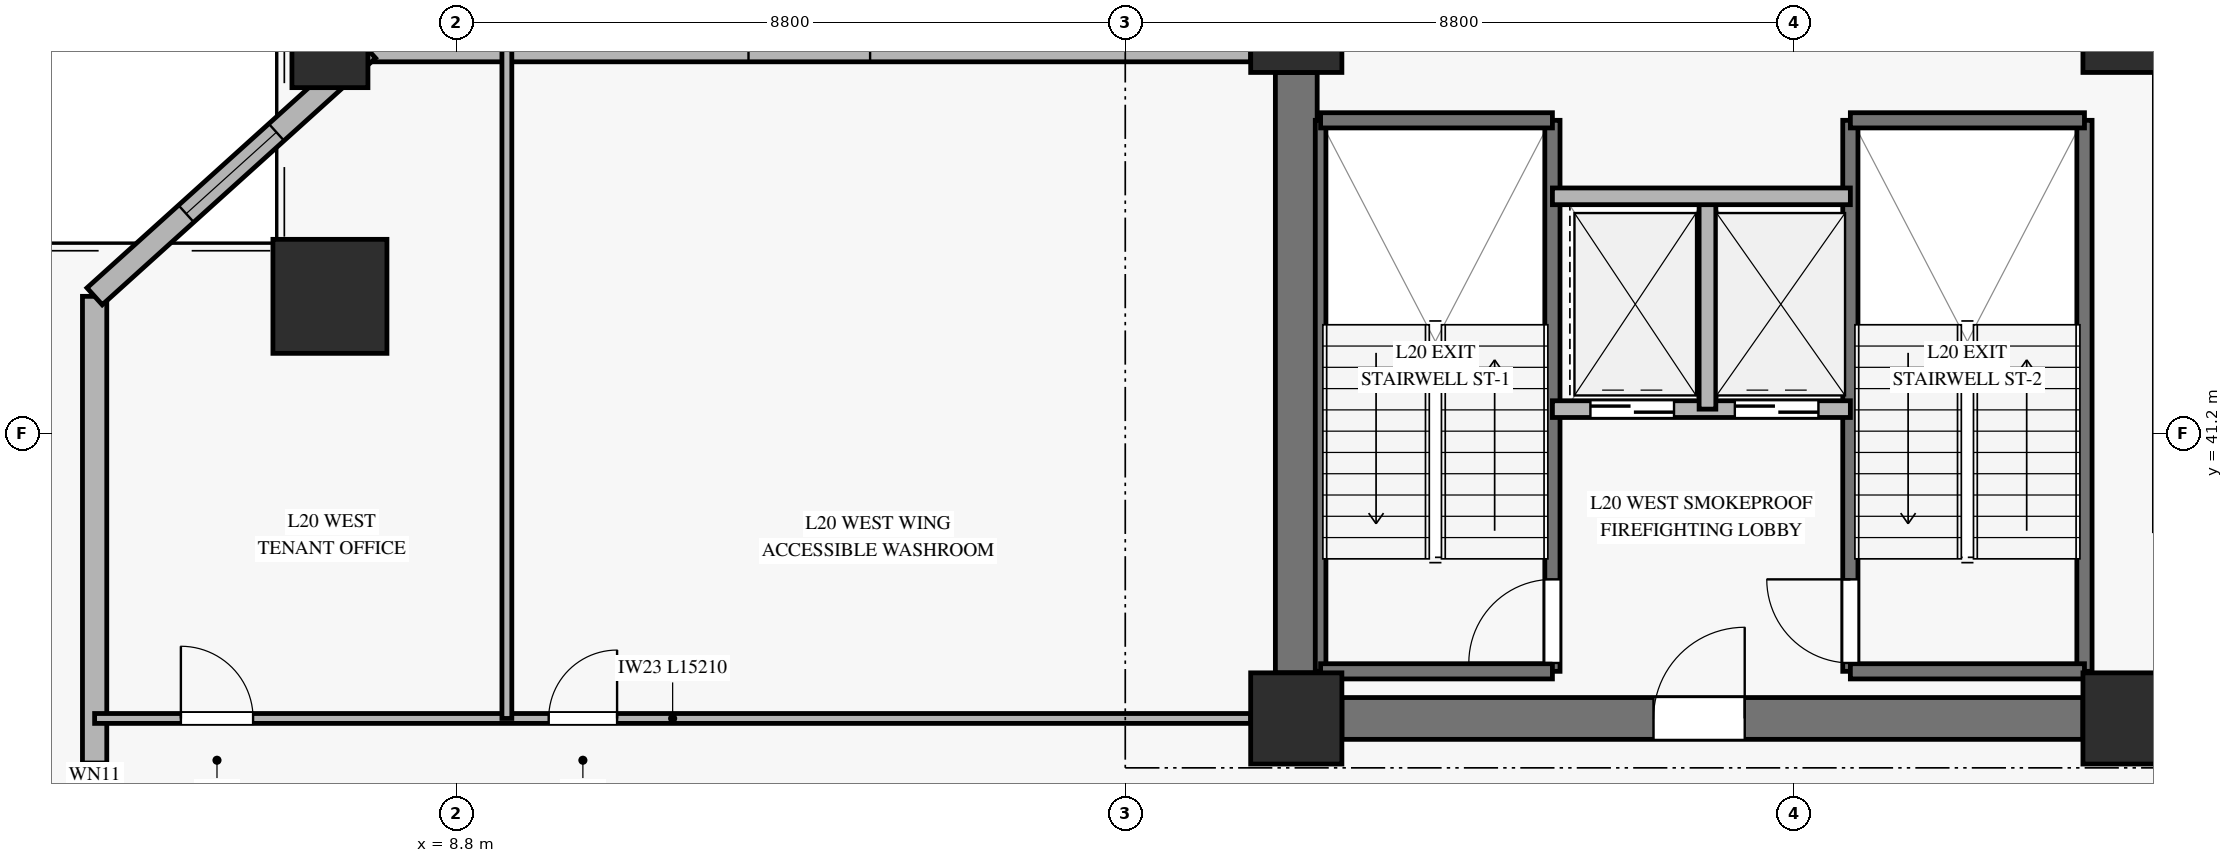
"""IFC4 building model, lengths in metres.
Left out: names, types, materials, properties, quantities, classifications, styles, units other than length and angle.
Written with IfcOpenShell. Run it as: python <this file> out.ifc"""

import sys

from ifc_helpers import new_model, si_unit, direction, frame, frame_2d, origin, origin_2d, place, context, subcontext, project, spatial, rectangle, hollow_rectangle, extrude, source, transform, mapped, element, fill, save


model = new_model("IFC4")
c1 = context("Model", 3, precision=1e-05, world=origin(), true_north=direction((0.0, 1.0)))
c2 = subcontext(c1, "Body", "Model", "MODEL_VIEW")
j1 = project(units=[si_unit("LENGTHUNIT", "METRE"), si_unit("PLANEANGLEUNIT", "RADIAN")], contexts=[c1])
p1 = place(None, origin())
s1 = spatial("IfcSite", under=j1, at=p1, CompositionType="ELEMENT")
p2 = place(p1, origin())
s2 = spatial("IfcBuilding", under=s1, at=p2, CompositionType="ELEMENT")
p3 = place(p2, frame((0.0, 0.0, 83.5)))
s3 = spatial("IfcBuildingStorey", under=s2, at=p3, CompositionType="ELEMENT", Elevation=83.5)
m1 = source(origin(), c2, "Body", "SweptSolid", [
    extrude(rectangle(XDim=1.2, YDim=1.2, at=origin_2d()), origin(), (0.0, 0.0, 1.0), 3.68),
])
for number, where, z_axis, x_axis in (
    (1, (19.85, 37.45, 0.0), (0.0, 0.0, 1.0), (1.0, 0.0, 0.0)),
    (2, (19.85, 46.55, 0.0), (0.0, 0.0, 1.0), (1.0, 0.0, 0.0)),
    (3, (30.8, 37.45, 0.0), (0.0, 0.0, 1.0), (1.0, 0.0, 0.0)),
    (4, (30.8, 46.55, 0.0), (0.0, 0.0, 1.0), (1.0, 0.0, 0.0)),
):
    element("IfcColumn", number, at=place(p3, frame(where, z_axis=z_axis, x_axis=x_axis)), inside=s3, PredefinedType="PILASTER", context=c2, shape_type="MappedRepresentation", body=[
        mapped(m1, transform((0.0, 0.0, 0.0), x_axis=(1.0, 0.0, 0.0), y_axis=(0.0, 1.0, 0.0), z_axis=(0.0, 0.0, 1.0), scale=1.0)),
    ])
p4 = place(p3, frame((20.45, 37.45, 0.0), z_axis=(0.0, 0.0, 1.0), x_axis=(1.0, 0.0, 0.0)))
e5 = element("IfcWall", 5, at=p4, inside=s3, PredefinedType="SHEAR", context=c2, shape_type="SweptSolid", body=[
    extrude(rectangle(XDim=9.75, YDim=0.55, at=frame_2d((4.875, 0.0))), origin(), (0.0, 0.0, 1.0), 3.68),
])
p5 = place(p4, frame((4.1, 0.0, 0.0)))
e6 = element("IfcOpeningElement", 6, at=p5, cuts=e5, PredefinedType="OPENING", context=c2, shape_type="SweptSolid", body=[
    extrude(rectangle(XDim=1.2, YDim=2.15, at=frame_2d((0.6, 1.075))), frame((0.0, 0.285, 0.0), z_axis=(0.0, -1.0, 0.0), x_axis=(1.0, 0.0, 0.0)), (0.0, 0.0, 1.0), 0.57),
])
p6 = place(p3, frame((19.85, 38.05, 0.0), z_axis=(0.0, 0.0, 1.0), x_axis=(0.0, 1.0, 0.0)))
e7 = element("IfcWall", 7, at=p6, inside=s3, PredefinedType="SHEAR", context=c2, shape_type="SweptSolid", body=[
    extrude(rectangle(XDim=7.9, YDim=0.55, at=frame_2d((3.95, 0.0))), origin(), (0.0, 0.0, 1.0), 3.68),
])
m2 = source(origin(), c2, "Body", "SweptSolid", [
    extrude(hollow_rectangle(XDim=1.5, YDim=1.5, WallThickness=0.07, at=origin_2d()), origin(), (0.0, 0.0, 1.0), 3.686),
])
p7 = place(p3, frame((7.136, 43.004, 0.0), z_axis=(0.056697506007, 0.007087188251, 0.998366247714), x_axis=(-0.124034734589, 0.992277876714, 0.0)))
e8 = element("IfcColumn", 8, at=p7, inside=s3, PredefinedType="COLUMN", context=c2, shape_type="MappedRepresentation", body=[
    mapped(m2, transform((0.0, 0.0, 0.0), x_axis=(1.0, 0.0, 0.0), y_axis=(0.0, 1.0, 0.0), z_axis=(0.0, 0.0, 1.0), scale=1.0)),
])
m3 = source(origin(), c2, "Body", "SweptSolid", [
    extrude(hollow_rectangle(XDim=1.0, YDim=1.0, WallThickness=0.045, at=origin_2d()), origin(), (0.0, 0.0, 1.0), 3.686),
])
p8 = place(p3, frame((7.136, 46.25, 0.0), z_axis=(0.056698929969, 0.0, 0.998391321747), x_axis=(0.0, 1.0, 0.0)))
e9 = element("IfcColumn", 9, at=p8, inside=s3, PredefinedType="COLUMN", context=c2, shape_type="MappedRepresentation", body=[
    mapped(m3, transform((0.0, 0.0, 0.0), x_axis=(1.0, 0.0, 0.0), y_axis=(0.0, 1.0, 0.0), z_axis=(0.0, 0.0, 1.0), scale=1.0)),
])
p9 = place(p3, frame((4.04, 26.255, 0.0), z_axis=(0.0, 0.0, 1.0), x_axis=(0.0, 1.0, 0.0)))
e10 = element("IfcWall", 10, at=p9, inside=s3, PredefinedType="SOLIDWALL", context=c2, shape_type="SweptSolid", body=[
    extrude(rectangle(XDim=16.749, YDim=0.32, at=frame_2d((8.375, 0.0))), origin(), (0.0, 0.0, 1.0), 3.16),
])
p10 = place(p9, frame((9.425, 0.0, 0.45)))
e11 = element("IfcOpeningElement", 11, at=p10, cuts=e10, PredefinedType="OPENING", context=c2, shape_type="SweptSolid", body=[
    extrude(rectangle(XDim=1.2, YDim=2.0, at=frame_2d((0.6, 1.0))), frame((0.0, 0.17, 0.0), z_axis=(0.0, -1.0, 0.0), x_axis=(1.0, 0.0, 0.0)), (0.0, 0.0, 1.0), 0.34),
])
p11 = place(p3, frame((7.636, 46.25, 0.0), z_axis=(0.0, 0.0, 1.0), x_axis=(1.0, 0.0, 0.0)))
e12 = element("IfcWall", 12, at=p11, inside=s3, PredefinedType="SOLIDWALL", context=c2, shape_type="SweptSolid", body=[
    extrude(rectangle(XDim=11.614, YDim=0.32, at=frame_2d((5.807, 0.0))), origin(), (0.0, 0.0, 1.0), 3.16),
])
p12 = place(p11, frame((5.007, 0.0, 0.45)))
e13 = element("IfcOpeningElement", 13, at=p12, cuts=e12, PredefinedType="OPENING", context=c2, shape_type="SweptSolid", body=[
    extrude(rectangle(XDim=1.6, YDim=2.0, at=frame_2d((0.8, 1.0))), frame((0.0, 0.17, 0.0), z_axis=(0.0, -1.0, 0.0), x_axis=(1.0, 0.0, 0.0)), (0.0, 0.0, 1.0), 0.34),
])
p13 = place(p3, frame((7.636, 46.25, 0.0), z_axis=(0.0, 0.0, 1.0), x_axis=(-0.742293455996, -0.670074939977, 0.0)))
e14 = element("IfcWall", 14, at=p13, inside=s3, PredefinedType="SOLIDWALL", context=c2, shape_type="SweptSolid", body=[
    extrude(rectangle(XDim=4.844, YDim=0.3, at=frame_2d((2.422, 0.0))), origin(), (0.0, 0.0, 1.0), 3.16),
])
p14 = place(p13, frame((1.622, 0.0, 0.45)))
e15 = element("IfcOpeningElement", 15, at=p14, cuts=e14, PredefinedType="OPENING", context=c2, shape_type="SweptSolid", body=[
    extrude(rectangle(XDim=1.6, YDim=2.0, at=frame_2d((0.8, 1.0))), frame((0.0, 0.16, 0.0), z_axis=(0.0, -1.0, 0.0), x_axis=(1.0, 0.0, 0.0)), (0.0, 0.0, 1.0), 0.32),
])
p15 = place(p3, frame((20.17, 38.07, 0.0), z_axis=(0.0, 0.0, 1.0), x_axis=(0.0, 1.0, 0.0)))
e16 = element("IfcWall", 16, at=p15, inside=s3, PredefinedType="SOLIDWALL", context=c2, shape_type="SweptSolid", body=[
    extrude(rectangle(XDim=7.25, YDim=0.14, at=frame_2d((3.625, 0.0))), origin(), (0.0, 0.0, 1.0), 3.9),
])
p16 = place(p3, frame((23.22, 38.07, 0.0), z_axis=(0.0, 0.0, 1.0), x_axis=(0.0, 1.0, 0.0)))
e17 = element("IfcWall", 17, at=p16, inside=s3, PredefinedType="SOLIDWALL", context=c2, shape_type="SweptSolid", body=[
    extrude(rectangle(XDim=7.25, YDim=0.2, at=frame_2d((3.625, 0.0))), origin(), (0.0, 0.0, 1.0), 3.9),
])
p17 = place(p16, frame((0.11, 0.0, 0.0)))
e18 = element("IfcOpeningElement", 18, at=p17, cuts=e17, PredefinedType="OPENING", context=c2, shape_type="SweptSolid", body=[
    extrude(rectangle(XDim=1.1, YDim=2.15, at=frame_2d((0.55, 1.075))), frame((0.0, 0.11, 0.0), z_axis=(0.0, -1.0, 0.0), x_axis=(1.0, 0.0, 0.0)), (0.0, 0.0, 1.0), 0.22),
])
for number, where, z_axis, x_axis in (
    (19, (20.17, 45.32, 0.0), (0.0, 0.0, 1.0), (1.0, 0.0, 0.0)),
    (20, (20.17, 38.07, 0.0), (0.0, 0.0, 1.0), (1.0, 0.0, 0.0)),
):
    element("IfcWall", number, at=place(p3, frame(where, z_axis=z_axis, x_axis=x_axis)), inside=s3, PredefinedType="SOLIDWALL", context=c2, shape_type="SweptSolid", body=[
        extrude(rectangle(XDim=3.05, YDim=0.2, at=frame_2d((1.525, 0.0))), origin(), (0.0, 0.0, 1.0), 3.9),
    ])
p18 = place(p3, frame((27.14, 38.07, 0.0), z_axis=(0.0, 0.0, 1.0), x_axis=(0.0, 1.0, 0.0)))
e21 = element("IfcWall", 21, at=p18, inside=s3, PredefinedType="SOLIDWALL", context=c2, shape_type="SweptSolid", body=[
    extrude(rectangle(XDim=7.25, YDim=0.2, at=frame_2d((3.625, 0.0))), origin(), (0.0, 0.0, 1.0), 3.9),
])
p19 = place(p18, frame((0.11, 0.0, 0.0)))
e22 = element("IfcOpeningElement", 22, at=p19, cuts=e21, PredefinedType="OPENING", context=c2, shape_type="SweptSolid", body=[
    extrude(rectangle(XDim=1.1, YDim=2.15, at=frame_2d((0.55, 1.075))), frame((0.0, 0.11, 0.0), z_axis=(0.0, -1.0, 0.0), x_axis=(1.0, 0.0, 0.0)), (0.0, 0.0, 1.0), 0.22),
])
p20 = place(p3, frame((30.22, 38.07, 0.0), z_axis=(0.0, 0.0, 1.0), x_axis=(0.0, 1.0, 0.0)))
e23 = element("IfcWall", 23, at=p20, inside=s3, PredefinedType="SOLIDWALL", context=c2, shape_type="SweptSolid", body=[
    extrude(rectangle(XDim=7.25, YDim=0.2, at=frame_2d((3.625, 0.0))), origin(), (0.0, 0.0, 1.0), 3.9),
])
for number, where, z_axis, x_axis in (
    (24, (27.14, 45.32, 0.0), (0.0, 0.0, 1.0), (1.0, 0.0, 0.0)),
    (25, (27.14, 38.07, 0.0), (0.0, 0.0, 1.0), (1.0, 0.0, 0.0)),
):
    element("IfcWall", number, at=place(p3, frame(where, z_axis=z_axis, x_axis=x_axis)), inside=s3, PredefinedType="SOLIDWALL", context=c2, shape_type="SweptSolid", body=[
        extrude(rectangle(XDim=3.08, YDim=0.2, at=frame_2d((1.54, 0.0))), origin(), (0.0, 0.0, 1.0), 3.9),
    ])
p21 = place(p3, frame((23.22, 41.52, 0.0), z_axis=(0.0, 0.0, 1.0), x_axis=(1.0, 0.0, 0.0)))
e26 = element("IfcWall", 26, at=p21, inside=s3, PredefinedType="SOLIDWALL", context=c2, shape_type="SweptSolid", body=[
    extrude(rectangle(XDim=3.92, YDim=0.22, at=frame_2d((1.96, 0.0))), origin(), (0.0, 0.0, 1.0), 3.68),
])
p22 = place(p21, frame((0.5, 0.0, 0.0)))
e27 = element("IfcOpeningElement", 27, at=p22, cuts=e26, PredefinedType="OPENING", context=c2, shape_type="SweptSolid", body=[
    extrude(rectangle(XDim=1.1, YDim=2.2, at=frame_2d((0.55, 1.1))), frame((0.0, 0.12, 0.0), z_axis=(0.0, -1.0, 0.0), x_axis=(1.0, 0.0, 0.0)), (0.0, 0.0, 1.0), 0.24),
])
p23 = place(p21, frame((2.4, 0.0, 0.0)))
e28 = element("IfcOpeningElement", 28, at=p23, cuts=e26, PredefinedType="OPENING", context=c2, shape_type="SweptSolid", body=[
    extrude(rectangle(XDim=1.1, YDim=2.2, at=frame_2d((0.55, 1.1))), frame((0.0, 0.12, 0.0), z_axis=(0.0, -1.0, 0.0), x_axis=(1.0, 0.0, 0.0)), (0.0, 0.0, 1.0), 0.24),
])
p24 = place(p3, frame((25.26, 41.52, 0.0), z_axis=(0.0, 0.0, 1.0), x_axis=(0.0, 1.0, 0.0)))
e29 = element("IfcWall", 29, at=p24, inside=s3, PredefinedType="SOLIDWALL", context=c2, shape_type="SweptSolid", body=[
    extrude(rectangle(XDim=2.8, YDim=0.22, at=frame_2d((1.4, 0.0))), origin(), (0.0, 0.0, 1.0), 3.68),
])
p25 = place(p3, frame((23.22, 44.32, 0.0), z_axis=(0.0, 0.0, 1.0), x_axis=(1.0, 0.0, 0.0)))
e30 = element("IfcWall", 30, at=p25, inside=s3, PredefinedType="SOLIDWALL", context=c2, shape_type="SweptSolid", body=[
    extrude(rectangle(XDim=3.92, YDim=0.22, at=frame_2d((1.96, 0.0))), origin(), (0.0, 0.0, 1.0), 3.68),
])
p26 = place(p3, frame((4.04, 37.45, 0.0), z_axis=(0.0, 0.0, 1.0), x_axis=(1.0, 0.0, 0.0)))
e31 = element("IfcWall", 31, at=p26, inside=s3, PredefinedType="PARTITIONING", context=c2, shape_type="SweptSolid", body=[
    extrude(rectangle(XDim=15.21, YDim=0.13, at=frame_2d((7.605, 0.0))), origin(), (0.0, 0.0, 1.0), 3.165),
])
p27 = place(p26, frame((1.135, 0.0, 0.0)))
e32 = element("IfcOpeningElement", 32, at=p27, cuts=e31, PredefinedType="OPENING", context=c2, shape_type="SweptSolid", body=[
    extrude(rectangle(XDim=0.95, YDim=2.1, at=frame_2d((0.475, 1.05))), frame((0.0, 0.075, 0.0), z_axis=(0.0, -1.0, 0.0), x_axis=(1.0, 0.0, 0.0)), (0.0, 0.0, 1.0), 0.15),
])
p28 = place(p26, frame((5.974, 0.0, 0.0)))
e33 = element("IfcOpeningElement", 33, at=p28, cuts=e31, PredefinedType="OPENING", context=c2, shape_type="SweptSolid", body=[
    extrude(rectangle(XDim=0.9, YDim=2.1, at=frame_2d((0.45, 1.05))), frame((0.0, 0.075, 0.0), z_axis=(0.0, -1.0, 0.0), x_axis=(1.0, 0.0, 0.0)), (0.0, 0.0, 1.0), 0.15),
])
p29 = place(p3, frame((9.464, 37.45, 0.0), z_axis=(0.0, 0.0, 1.0), x_axis=(0.0, 1.0, 0.0)))
e34 = element("IfcWall", 34, at=p29, inside=s3, PredefinedType="PARTITIONING", context=c2, shape_type="SweptSolid", body=[
    extrude(rectangle(XDim=8.8, YDim=0.13, at=frame_2d((4.4, 0.0))), origin(), (0.0, 0.0, 1.0), 3.68),
])
m4 = source(origin(), c2, "Body", "SweptSolid", [
    extrude(rectangle(XDim=1.2, YDim=2.0, at=frame_2d((0.6, 1.0))), frame((0.0, 0.03, 0.0), z_axis=(0.0, -1.0, 0.0), x_axis=(1.0, 0.0, 0.0)), (0.0, 0.0, 1.0), 0.06),
])
p30 = place(p10, origin())
e35 = element("IfcWindow", 35, at=p30, inside=s3, PartitioningType="SINGLE_PANEL", PredefinedType="WINDOW", context=c2, shape_type="MappedRepresentation", body=[
    mapped(m4, transform((0.0, 0.0, 0.0), x_axis=(1.0, 0.0, 0.0), y_axis=(0.0, 1.0, 0.0), z_axis=(0.0, 0.0, 1.0), scale=1.0)),
])
fill(e11, e35)
m5 = source(origin(), c2, "Body", "SweptSolid", [
    extrude(rectangle(XDim=1.6, YDim=2.0, at=frame_2d((0.8, 1.0))), frame((0.0, 0.03, 0.0), z_axis=(0.0, -1.0, 0.0), x_axis=(1.0, 0.0, 0.0)), (0.0, 0.0, 1.0), 0.06),
])
p31 = place(p14, origin())
e36 = element("IfcWindow", 36, at=p31, inside=s3, PartitioningType="SINGLE_PANEL", PredefinedType="WINDOW", context=c2, shape_type="MappedRepresentation", body=[
    mapped(m5, transform((0.0, 0.0, 0.0), x_axis=(1.0, 0.0, 0.0), y_axis=(0.0, 1.0, 0.0), z_axis=(0.0, 0.0, 1.0), scale=1.0)),
])
fill(e15, e36)
m6 = source(origin(), c2, "Body", "SweptSolid", [
    extrude(rectangle(XDim=1.1, YDim=2.15, at=frame_2d((0.55, 1.075))), frame((0.0, 0.025, 0.0), z_axis=(0.0, -1.0, 0.0), x_axis=(1.0, 0.0, 0.0)), (0.0, 0.0, 1.0), 0.05),
])
p32 = place(p17, origin())
e37 = element("IfcDoor", 37, at=p32, inside=s3, OperationType="SINGLE_SWING_LEFT", PredefinedType="DOOR", context=c2, shape_type="MappedRepresentation", body=[
    mapped(m6, transform((0.0, 0.0, 0.0), x_axis=(1.0, 0.0, 0.0), y_axis=(0.0, 1.0, 0.0), z_axis=(0.0, 0.0, 1.0), scale=1.0)),
])
fill(e18, e37)
p33 = place(p19, origin())
e38 = element("IfcDoor", 38, at=p33, inside=s3, OperationType="SINGLE_SWING_RIGHT", PredefinedType="DOOR", context=c2, shape_type="MappedRepresentation", body=[
    mapped(m6, transform((0.0, 0.0, 0.0), x_axis=(1.0, 0.0, 0.0), y_axis=(0.0, 1.0, 0.0), z_axis=(0.0, 0.0, 1.0), scale=1.0)),
])
fill(e22, e38)
m7 = source(origin(), c2, "Body", "SweptSolid", [
    extrude(rectangle(XDim=1.1, YDim=2.2, at=frame_2d((0.55, 1.1))), frame((0.0, 0.025, 0.0), z_axis=(0.0, -1.0, 0.0), x_axis=(1.0, 0.0, 0.0)), (0.0, 0.0, 1.0), 0.05),
])
p34 = place(p22, origin())
e39 = element("IfcDoor", 39, at=p34, inside=s3, OperationType="SLIDING_TO_LEFT", PredefinedType="DOOR", context=c2, shape_type="MappedRepresentation", body=[
    mapped(m7, transform((0.0, 0.0, 0.0), x_axis=(1.0, 0.0, 0.0), y_axis=(0.0, 1.0, 0.0), z_axis=(0.0, 0.0, 1.0), scale=1.0)),
])
fill(e27, e39)
p35 = place(p23, origin())
e40 = element("IfcDoor", 40, at=p35, inside=s3, OperationType="SLIDING_TO_LEFT", PredefinedType="DOOR", context=c2, shape_type="MappedRepresentation", body=[
    mapped(m7, transform((0.0, 0.0, 0.0), x_axis=(1.0, 0.0, 0.0), y_axis=(0.0, 1.0, 0.0), z_axis=(0.0, 0.0, 1.0), scale=1.0)),
])
fill(e28, e40)
m8 = source(origin(), c2, "Body", "SweptSolid", [
    extrude(rectangle(XDim=1.2, YDim=2.15, at=frame_2d((0.6, 1.075))), frame((0.0, 0.025, 0.0), z_axis=(0.0, -1.0, 0.0), x_axis=(1.0, 0.0, 0.0)), (0.0, 0.0, 1.0), 0.05),
])
p36 = place(p5, origin())
e41 = element("IfcDoor", 41, at=p36, inside=s3, OperationType="SINGLE_SWING_RIGHT", PredefinedType="DOOR", context=c2, shape_type="MappedRepresentation", body=[
    mapped(m8, transform((0.0, 0.0, 0.0), x_axis=(1.0, 0.0, 0.0), y_axis=(0.0, 1.0, 0.0), z_axis=(0.0, 0.0, 1.0), scale=1.0)),
])
fill(e6, e41)
m9 = source(origin(), c2, "Body", "SweptSolid", [
    extrude(rectangle(XDim=0.95, YDim=2.1, at=frame_2d((0.475, 1.05))), frame((0.0, 0.025, 0.0), z_axis=(0.0, -1.0, 0.0), x_axis=(1.0, 0.0, 0.0)), (0.0, 0.0, 1.0), 0.05),
])
p37 = place(p27, origin())
e42 = element("IfcDoor", 42, at=p37, inside=s3, OperationType="SINGLE_SWING_LEFT", PredefinedType="DOOR", context=c2, shape_type="MappedRepresentation", body=[
    mapped(m9, transform((0.0, 0.0, 0.0), x_axis=(1.0, 0.0, 0.0), y_axis=(0.0, 1.0, 0.0), z_axis=(0.0, 0.0, 1.0), scale=1.0)),
])
fill(e32, e42)
m10 = source(origin(), c2, "Body", "SweptSolid", [
    extrude(rectangle(XDim=0.9, YDim=2.1, at=frame_2d((0.45, 1.05))), frame((0.0, 0.025, 0.0), z_axis=(0.0, -1.0, 0.0), x_axis=(1.0, 0.0, 0.0)), (0.0, 0.0, 1.0), 0.05),
])
p38 = place(p28, origin())
e43 = element("IfcDoor", 43, at=p38, inside=s3, OperationType="SINGLE_SWING_RIGHT", PredefinedType="DOOR", context=c2, shape_type="MappedRepresentation", body=[
    mapped(m10, transform((0.0, 0.0, 0.0), x_axis=(1.0, 0.0, 0.0), y_axis=(0.0, 1.0, 0.0), z_axis=(0.0, 0.0, 1.0), scale=1.0)),
])
fill(e33, e43)
save(model, sys.argv[1])
